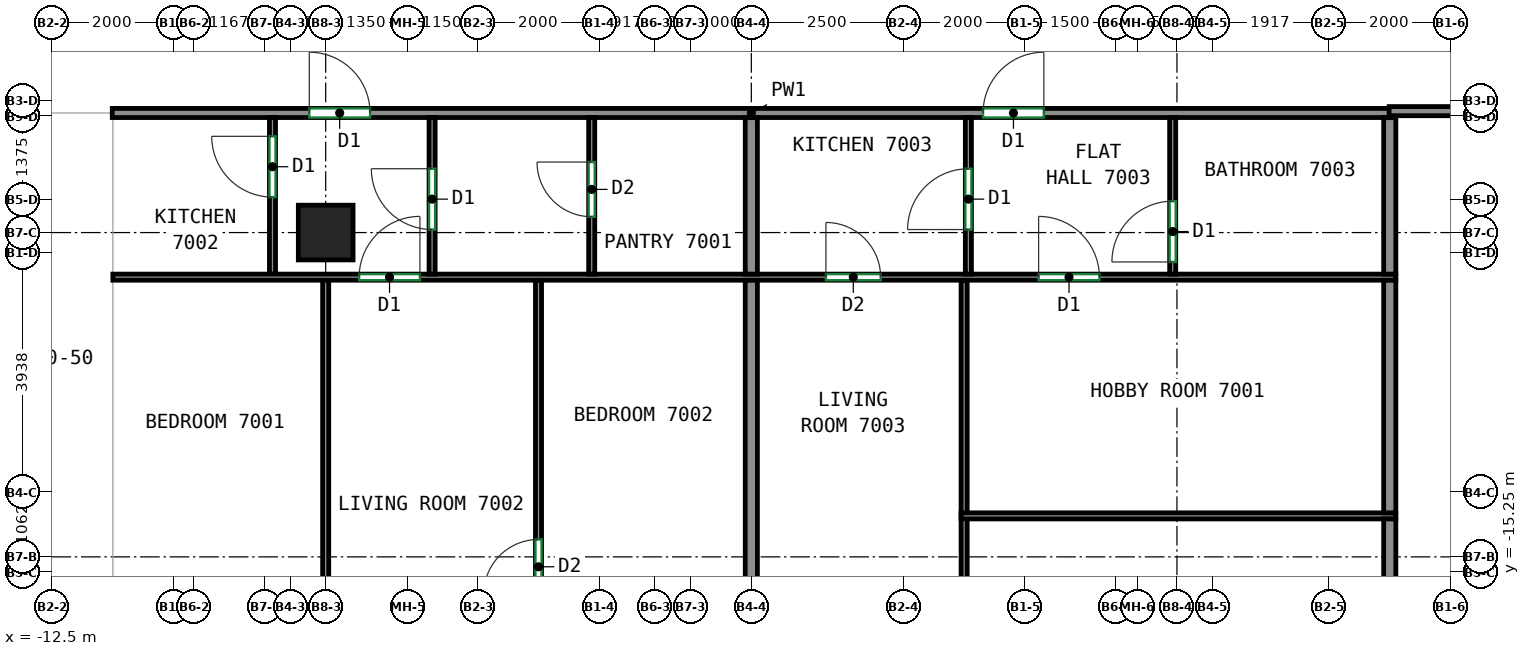
"""IFC4 building model, lengths in metres.
Left out: names, types, materials, properties, quantities, classifications, styles, units other than length and angle.
Written with IfcOpenShell. Run it as: python <this file> out.ifc"""

import sys

from ifc_helpers import new_model, si_unit, direction, frame, frame_2d, origin, origin_2d, place, context, subcontext, project, spatial, rectangle, extrude, source, transform, mapped, element, fill, save


model = new_model("IFC4")
c1 = context("Model", 3, precision=1e-05, world=origin(), true_north=direction((0.0, 1.0)))
c2 = subcontext(c1, "Body", "Model", "MODEL_VIEW")
j1 = project(units=[si_unit("LENGTHUNIT", "METRE"), si_unit("PLANEANGLEUNIT", "RADIAN")], contexts=[c1])
p1 = place(None, origin())
s1 = spatial("IfcSite", under=j1, at=p1, CompositionType="ELEMENT")
p2 = place(p1, origin())
s2 = spatial("IfcBuilding", under=s1, at=p2, CompositionType="ELEMENT")
p3 = place(p2, frame((0.0, 0.0, 284.0)))
s3 = spatial("IfcBuildingStorey", under=s2, at=p3, CompositionType="ELEMENT", Elevation=284.0)
m1 = source(origin(), c2, "Body", "SweptSolid", [
    extrude(rectangle(XDim=0.9, YDim=0.9, at=origin_2d()), origin(), (0.0, 0.0, 1.0), 3.12),
])
p4 = place(p3, frame((-8.0, -9.667, 0.0), z_axis=(0.0, 0.0, 1.0), x_axis=(1.0, 0.0, 0.0)))
e1 = element("IfcColumn", 1, at=p4, inside=s3, PredefinedType="COLUMN", context=c2, shape_type="MappedRepresentation", body=[
    mapped(m1, transform((0.0, 0.0, 0.0))),
])
p5 = place(p3, frame((-11.51, -7.7, 0.0), z_axis=(0.0, 0.0, 1.0), x_axis=(1.0, 0.0, 0.0)))
e2 = element("IfcWall", 2, at=p5, inside=s3, PredefinedType="PARTITIONING", context=c2, shape_type="SweptSolid", body=[
    extrude(rectangle(XDim=21.02, YDim=0.15, at=frame_2d((10.51, 0.0))), origin(), (0.0, 0.0, 1.0), 3.12),
])
p6 = place(p5, frame((3.24, 0.0, 0.0)))
e3 = element("IfcOpeningElement", 3, at=p6, cuts=e2, PredefinedType="OPENING", context=c2, shape_type="SweptSolid", body=[
    extrude(rectangle(XDim=1.0, YDim=2.1, at=frame_2d((0.5, 1.05))), frame((0.0, 0.085, 0.0), z_axis=(0.0, -1.0, 0.0), x_axis=(1.0, 0.0, 0.0)), (0.0, 0.0, 1.0), 0.17),
])
p7 = place(p5, frame((14.321, 0.0, 0.0)))
e4 = element("IfcOpeningElement", 4, at=p7, cuts=e2, PredefinedType="OPENING", context=c2, shape_type="SweptSolid", body=[
    extrude(rectangle(XDim=1.0, YDim=2.1, at=frame_2d((0.5, 1.05))), frame((0.0, 0.085, 0.0), z_axis=(0.0, -1.0, 0.0), x_axis=(1.0, 0.0, 0.0)), (0.0, 0.0, 1.0), 0.17),
])
p8 = place(p3, frame((9.49, -7.67, 0.0), z_axis=(0.0, 0.0, 1.0), x_axis=(1.0, 0.0, 0.0)))
e5 = element("IfcWall", 5, at=p8, inside=s3, PredefinedType="PARTITIONING", context=c2, shape_type="SweptSolid", body=[
    extrude(rectangle(XDim=9.61, YDim=0.15, at=frame_2d((4.805, 0.0))), origin(), (0.0, 0.0, 1.0), 3.12),
])
p9 = place(p8, frame((3.304, 0.0, 0.0)))
e6 = element("IfcOpeningElement", 6, at=p9, cuts=e5, PredefinedType="OPENING", context=c2, shape_type="SweptSolid", body=[
    extrude(rectangle(XDim=0.9, YDim=2.1, at=frame_2d((0.45, 1.05))), frame((0.0, 0.085, 0.0), z_axis=(0.0, -1.0, 0.0), x_axis=(1.0, 0.0, 0.0)), (0.0, 0.0, 1.0), 0.17),
])
p10 = place(p3, frame((-8.875, -10.35, 0.0), z_axis=(0.0, 0.0, 1.0), x_axis=(0.0, 1.0, 0.0)))
e7 = element("IfcWall", 7, at=p10, inside=s3, PredefinedType="PARTITIONING", context=c2, shape_type="SweptSolid", body=[
    extrude(rectangle(XDim=2.573, YDim=0.1, at=frame_2d((1.287, 0.0))), origin(), (0.0, 0.0, 1.0), 3.12),
])
p11 = place(p10, frame((1.266, 0.0, 0.0)))
e8 = element("IfcOpeningElement", 8, at=p11, cuts=e7, PredefinedType="OPENING", context=c2, shape_type="SweptSolid", body=[
    extrude(rectangle(XDim=1.0, YDim=2.1, at=frame_2d((0.5, 1.05))), frame((0.0, 0.06, 0.0), z_axis=(0.0, -1.0, 0.0), x_axis=(1.0, 0.0, 0.0)), (0.0, 0.0, 1.0), 0.12),
])
p12 = place(p3, frame((-11.5, -10.4, 0.0), z_axis=(0.0, 0.0, 1.0), x_axis=(1.0, 0.0, 0.0)))
e9 = element("IfcWall", 9, at=p12, inside=s3, PredefinedType="PARTITIONING", context=c2, shape_type="SweptSolid", body=[
    extrude(rectangle(XDim=21.1, YDim=0.1, at=frame_2d((10.55, 0.0))), origin(), (0.0, 0.0, 1.0), 3.12),
])
p13 = place(p12, frame((4.05, 0.0, 0.0)))
e10 = element("IfcOpeningElement", 10, at=p13, cuts=e9, PredefinedType="OPENING", context=c2, shape_type="SweptSolid", body=[
    extrude(rectangle(XDim=1.0, YDim=2.1, at=frame_2d((0.5, 1.05))), frame((0.0, 0.06, 0.0), z_axis=(0.0, -1.0, 0.0), x_axis=(1.0, 0.0, 0.0)), (0.0, 0.0, 1.0), 0.12),
])
p14 = place(p12, frame((11.727, 0.0, 0.0)))
e11 = element("IfcOpeningElement", 11, at=p14, cuts=e9, PredefinedType="OPENING", context=c2, shape_type="SweptSolid", body=[
    extrude(rectangle(XDim=0.9, YDim=2.1, at=frame_2d((0.45, 1.05))), frame((0.0, 0.06, 0.0), z_axis=(0.0, -1.0, 0.0), x_axis=(1.0, 0.0, 0.0)), (0.0, 0.0, 1.0), 0.12),
])
p15 = place(p12, frame((15.225, 0.0, 0.0)))
e12 = element("IfcOpeningElement", 12, at=p15, cuts=e9, PredefinedType="OPENING", context=c2, shape_type="SweptSolid", body=[
    extrude(rectangle(XDim=1.0, YDim=2.1, at=frame_2d((0.5, 1.05))), frame((0.0, 0.06, 0.0), z_axis=(0.0, -1.0, 0.0), x_axis=(1.0, 0.0, 0.0)), (0.0, 0.0, 1.0), 0.12),
])
p16 = place(p3, frame((-6.25, -10.35, 0.0), z_axis=(0.0, 0.0, 1.0), x_axis=(0.0, 1.0, 0.0)))
e13 = element("IfcWall", 13, at=p16, inside=s3, PredefinedType="PARTITIONING", context=c2, shape_type="SweptSolid", body=[
    extrude(rectangle(XDim=2.573, YDim=0.1, at=frame_2d((1.287, 0.0))), origin(), (0.0, 0.0, 1.0), 3.12),
])
p17 = place(p16, frame((0.733, 0.0, 0.0)))
e14 = element("IfcOpeningElement", 14, at=p17, cuts=e13, PredefinedType="OPENING", context=c2, shape_type="SweptSolid", body=[
    extrude(rectangle(XDim=1.0, YDim=2.1, at=frame_2d((0.5, 1.05))), frame((0.0, 0.06, 0.0), z_axis=(0.0, -1.0, 0.0), x_axis=(1.0, 0.0, 0.0)), (0.0, 0.0, 1.0), 0.12),
])
p18 = place(p3, frame((-3.625, -10.35, 0.0), z_axis=(0.0, 0.0, 1.0), x_axis=(0.0, 1.0, 0.0)))
e15 = element("IfcWall", 15, at=p18, inside=s3, PredefinedType="PARTITIONING", context=c2, shape_type="SweptSolid", body=[
    extrude(rectangle(XDim=2.573, YDim=0.1, at=frame_2d((1.287, 0.0))), origin(), (0.0, 0.0, 1.0), 3.12),
])
p19 = place(p18, frame((0.943, 0.0, 0.0)))
e16 = element("IfcOpeningElement", 16, at=p19, cuts=e15, PredefinedType="OPENING", context=c2, shape_type="SweptSolid", body=[
    extrude(rectangle(XDim=0.9, YDim=2.1, at=frame_2d((0.45, 1.05))), frame((0.0, 0.06, 0.0), z_axis=(0.0, -1.0, 0.0), x_axis=(1.0, 0.0, 0.0)), (0.0, 0.0, 1.0), 0.12),
])
p20 = place(p3, frame((-1.0, -10.35, 0.0), z_axis=(0.0, 0.0, 1.0), x_axis=(0.0, 1.0, 0.0)))
e17 = element("IfcWall", 17, at=p20, inside=s3, PredefinedType="PARTITIONING", context=c2, shape_type="SweptSolid", body=[
    extrude(rectangle(XDim=2.573, YDim=0.2, at=frame_2d((1.287, 0.0))), origin(), (0.0, 0.0, 1.0), 3.12),
])
p21 = place(p3, frame((-8.0, -17.725, 0.0), z_axis=(0.0, 0.0, 1.0), x_axis=(0.0, 1.0, 0.0)))
e18 = element("IfcWall", 18, at=p21, inside=s3, PredefinedType="PARTITIONING", context=c2, shape_type="SweptSolid", body=[
    extrude(rectangle(XDim=7.273, YDim=0.1, at=frame_2d((3.637, 0.0))), origin(), (0.0, 0.0, 1.0), 3.12),
])
p22 = place(p21, frame((1.111, 0.0, 0.0)))
e19 = element("IfcOpeningElement", 19, at=p22, cuts=e18, PredefinedType="OPENING", context=c2, shape_type="SweptSolid", body=[
    extrude(rectangle(XDim=0.9, YDim=2.1, at=frame_2d((0.45, 1.05))), frame((0.0, 0.06, 0.0), z_axis=(0.0, -1.0, 0.0), x_axis=(1.0, 0.0, 0.0)), (0.0, 0.0, 1.0), 0.12),
])
p23 = place(p3, frame((-4.5, -18.25, 0.0), z_axis=(0.0, 0.0, 1.0), x_axis=(0.0, 1.0, 0.0)))
e20 = element("IfcWall", 20, at=p23, inside=s3, PredefinedType="PARTITIONING", context=c2, shape_type="SweptSolid", body=[
    extrude(rectangle(XDim=7.798, YDim=0.1, at=frame_2d((3.899, 0.0))), origin(), (0.0, 0.0, 1.0), 3.12),
])
p24 = place(p23, frame((2.637, 0.0, 0.0)))
e21 = element("IfcOpeningElement", 21, at=p24, cuts=e20, PredefinedType="OPENING", context=c2, shape_type="SweptSolid", body=[
    extrude(rectangle(XDim=0.9, YDim=2.1, at=frame_2d((0.45, 1.05))), frame((0.0, 0.06, 0.0), z_axis=(0.0, -1.0, 0.0), x_axis=(1.0, 0.0, 0.0)), (0.0, 0.0, 1.0), 0.12),
])
p25 = place(p3, frame((-1.0, -17.725, 0.0), z_axis=(0.0, 0.0, 1.0), x_axis=(0.0, 1.0, 0.0)))
e22 = element("IfcWall", 22, at=p25, inside=s3, PredefinedType="PARTITIONING", context=c2, shape_type="SweptSolid", body=[
    extrude(rectangle(XDim=7.273, YDim=0.2, at=frame_2d((3.637, 0.0))), origin(), (0.0, 0.0, 1.0), 3.12),
])
p26 = place(p3, frame((2.57, -10.35, 0.0), z_axis=(0.0, 0.0, 1.0), x_axis=(0.0, 1.0, 0.0)))
e23 = element("IfcWall", 23, at=p26, inside=s3, PredefinedType="PARTITIONING", context=c2, shape_type="SweptSolid", body=[
    extrude(rectangle(XDim=2.573, YDim=0.1, at=frame_2d((1.287, 0.0))), origin(), (0.0, 0.0, 1.0), 3.12),
])
p27 = place(p26, frame((0.733, 0.0, 0.0)))
e24 = element("IfcOpeningElement", 24, at=p27, cuts=e23, PredefinedType="OPENING", context=c2, shape_type="SweptSolid", body=[
    extrude(rectangle(XDim=1.0, YDim=2.1, at=frame_2d((0.5, 1.05))), frame((0.0, 0.06, 0.0), z_axis=(0.0, -1.0, 0.0), x_axis=(1.0, 0.0, 0.0)), (0.0, 0.0, 1.0), 0.12),
])
p28 = place(p3, frame((5.93, -10.35, 0.0), z_axis=(0.0, 0.0, 1.0), x_axis=(0.0, 1.0, 0.0)))
e25 = element("IfcWall", 25, at=p28, inside=s3, PredefinedType="PARTITIONING", context=c2, shape_type="SweptSolid", body=[
    extrude(rectangle(XDim=2.573, YDim=0.1, at=frame_2d((1.287, 0.0))), origin(), (0.0, 0.0, 1.0), 3.12),
])
p29 = place(p28, frame((0.2, 0.0, 0.0)))
e26 = element("IfcOpeningElement", 26, at=p29, cuts=e25, PredefinedType="OPENING", context=c2, shape_type="SweptSolid", body=[
    extrude(rectangle(XDim=1.0, YDim=2.1, at=frame_2d((0.5, 1.05))), frame((0.0, 0.06, 0.0), z_axis=(0.0, -1.0, 0.0), x_axis=(1.0, 0.0, 0.0)), (0.0, 0.0, 1.0), 0.12),
])
p30 = place(p3, frame((9.5, -10.35, 0.0), z_axis=(0.0, 0.0, 1.0), x_axis=(0.0, 1.0, 0.0)))
e27 = element("IfcWall", 27, at=p30, inside=s3, PredefinedType="PARTITIONING", context=c2, shape_type="SweptSolid", body=[
    extrude(rectangle(XDim=2.573, YDim=0.2, at=frame_2d((1.287, 0.0))), origin(), (0.0, 0.0, 1.0), 3.12),
])
p31 = place(p3, frame((2.5, -18.25, 0.0), z_axis=(0.0, 0.0, 1.0), x_axis=(0.0, 1.0, 0.0)))
e28 = element("IfcWall", 28, at=p31, inside=s3, PredefinedType="PARTITIONING", context=c2, shape_type="SweptSolid", body=[
    extrude(rectangle(XDim=3.884, YDim=0.1, at=frame_2d((1.942, 0.0))), origin(), (0.0, 0.0, 1.0), 3.12),
])
p32 = place(p31, frame((1.337, 0.0, 0.0)))
e29 = element("IfcOpeningElement", 29, at=p32, cuts=e28, PredefinedType="OPENING", context=c2, shape_type="SweptSolid", body=[
    extrude(rectangle(XDim=0.9, YDim=2.1, at=frame_2d((0.45, 1.05))), frame((0.0, 0.06, 0.0), z_axis=(0.0, -1.0, 0.0), x_axis=(1.0, 0.0, 0.0)), (0.0, 0.0, 1.0), 0.12),
])
p33 = place(p3, frame((2.5, -14.286, 0.0), z_axis=(0.0, 0.0, 1.0), x_axis=(0.0, 1.0, 0.0)))
e30 = element("IfcWall", 30, at=p33, inside=s3, PredefinedType="PARTITIONING", context=c2, shape_type="SweptSolid", body=[
    extrude(rectangle(XDim=3.834, YDim=0.1, at=frame_2d((1.917, 0.0))), origin(), (0.0, 0.0, 1.0), 3.12),
])
p34 = place(p3, frame((9.6, -14.326, 0.0), z_axis=(0.0, 0.0, 1.0), x_axis=(-1.0, 0.0, 0.0)))
e31 = element("IfcWall", 31, at=p34, inside=s3, PredefinedType="PARTITIONING", context=c2, shape_type="SweptSolid", body=[
    extrude(rectangle(XDim=7.15, YDim=0.1, at=frame_2d((3.575, 0.0))), origin(), (0.0, 0.0, 1.0), 3.12),
])
p35 = place(p3, frame((9.5, -18.25, 0.0), z_axis=(0.0, 0.0, 1.0), x_axis=(0.0, 1.0, 0.0)))
e32 = element("IfcWall", 32, at=p35, inside=s3, PredefinedType="PARTITIONING", context=c2, shape_type="SweptSolid", body=[
    extrude(rectangle(XDim=3.874, YDim=0.2, at=frame_2d((1.937, 0.0))), origin(), (0.0, 0.0, 1.0), 3.12),
])
p36 = place(p3, frame((9.5, -14.276, 0.0), z_axis=(0.0, 0.0, 1.0), x_axis=(0.0, 1.0, 0.0)))
e33 = element("IfcWall", 33, at=p36, inside=s3, PredefinedType="PARTITIONING", context=c2, shape_type="SweptSolid", body=[
    extrude(rectangle(XDim=3.824, YDim=0.2, at=frame_2d((1.912, 0.0))), origin(), (0.0, 0.0, 1.0), 3.12),
])
p37 = place(p24, origin())
e34 = element("IfcDoor", 34, at=p37, inside=s3, OperationType="SINGLE_SWING_LEFT", PredefinedType="DOOR", context=c2, shape_type="SweptSolid", body=[
    extrude(rectangle(XDim=0.9, YDim=2.1, at=frame_2d((0.45, 1.05))), frame((0.0, 0.025, 0.0), z_axis=(0.0, -1.0, 0.0), x_axis=(1.0, 0.0, 0.0)), (0.0, 0.0, 1.0), 0.05),
])
fill(e21, e34)
p38 = place(p13, origin())
e35 = element("IfcDoor", 35, at=p38, inside=s3, OperationType="SINGLE_SWING_RIGHT", PredefinedType="DOOR", context=c2, shape_type="SweptSolid", body=[
    extrude(rectangle(XDim=1.0, YDim=2.1, at=frame_2d((0.5, 1.05))), frame((0.0, 0.025, 0.0), z_axis=(0.0, -1.0, 0.0), x_axis=(1.0, 0.0, 0.0)), (0.0, 0.0, 1.0), 0.05),
])
fill(e10, e35)
p39 = place(p14, origin())
e36 = element("IfcDoor", 36, at=p39, inside=s3, OperationType="SINGLE_SWING_LEFT", PredefinedType="DOOR", context=c2, shape_type="SweptSolid", body=[
    extrude(rectangle(XDim=0.9, YDim=2.1, at=frame_2d((0.45, 1.05))), frame((0.0, 0.025, 0.0), z_axis=(0.0, -1.0, 0.0), x_axis=(1.0, 0.0, 0.0)), (0.0, 0.0, 1.0), 0.05),
])
fill(e11, e36)
p40 = place(p15, origin())
e37 = element("IfcDoor", 37, at=p40, inside=s3, OperationType="SINGLE_SWING_LEFT", PredefinedType="DOOR", context=c2, shape_type="SweptSolid", body=[
    extrude(rectangle(XDim=1.0, YDim=2.1, at=frame_2d((0.5, 1.05))), frame((0.0, 0.025, 0.0), z_axis=(0.0, -1.0, 0.0), x_axis=(1.0, 0.0, 0.0)), (0.0, 0.0, 1.0), 0.05),
])
fill(e12, e37)
p41 = place(p29, origin())
e38 = element("IfcDoor", 38, at=p41, inside=s3, OperationType="SINGLE_SWING_LEFT", PredefinedType="DOOR", context=c2, shape_type="SweptSolid", body=[
    extrude(rectangle(XDim=1.0, YDim=2.1, at=frame_2d((0.5, 1.05))), frame((0.0, 0.025, 0.0), z_axis=(0.0, -1.0, 0.0), x_axis=(1.0, 0.0, 0.0)), (0.0, 0.0, 1.0), 0.05),
])
fill(e26, e38)
p42 = place(p17, origin())
e39 = element("IfcDoor", 39, at=p42, inside=s3, OperationType="SINGLE_SWING_RIGHT", PredefinedType="DOOR", context=c2, shape_type="SweptSolid", body=[
    extrude(rectangle(XDim=1.0, YDim=2.1, at=frame_2d((0.5, 1.05))), frame((0.0, 0.025, 0.0), z_axis=(0.0, -1.0, 0.0), x_axis=(1.0, 0.0, 0.0)), (0.0, 0.0, 1.0), 0.05),
])
fill(e14, e39)
p43 = place(p27, origin())
e40 = element("IfcDoor", 40, at=p43, inside=s3, OperationType="SINGLE_SWING_LEFT", PredefinedType="DOOR", context=c2, shape_type="SweptSolid", body=[
    extrude(rectangle(XDim=1.0, YDim=2.1, at=frame_2d((0.5, 1.05))), frame((0.0, 0.025, 0.0), z_axis=(0.0, -1.0, 0.0), x_axis=(1.0, 0.0, 0.0)), (0.0, 0.0, 1.0), 0.05),
])
fill(e24, e40)
p44 = place(p19, origin())
e41 = element("IfcDoor", 41, at=p44, inside=s3, OperationType="SINGLE_SWING_RIGHT", PredefinedType="DOOR", context=c2, shape_type="SweptSolid", body=[
    extrude(rectangle(XDim=0.9, YDim=2.1, at=frame_2d((0.45, 1.05))), frame((0.0, 0.025, 0.0), z_axis=(0.0, -1.0, 0.0), x_axis=(1.0, 0.0, 0.0)), (0.0, 0.0, 1.0), 0.05),
])
fill(e16, e41)
p45 = place(p11, origin())
e42 = element("IfcDoor", 42, at=p45, inside=s3, OperationType="SINGLE_SWING_RIGHT", PredefinedType="DOOR", context=c2, shape_type="SweptSolid", body=[
    extrude(rectangle(XDim=1.0, YDim=2.1, at=frame_2d((0.5, 1.05))), frame((0.0, 0.025, 0.0), z_axis=(0.0, -1.0, 0.0), x_axis=(1.0, 0.0, 0.0)), (0.0, 0.0, 1.0), 0.05),
])
fill(e8, e42)
p46 = place(p6, origin())
e43 = element("IfcDoor", 43, at=p46, inside=s3, OperationType="SINGLE_SWING_LEFT", PredefinedType="DOOR", context=c2, shape_type="SweptSolid", body=[
    extrude(rectangle(XDim=1.0, YDim=2.1, at=frame_2d((0.5, 1.05))), frame((0.0, 0.025, 0.0), z_axis=(0.0, -1.0, 0.0), x_axis=(1.0, 0.0, 0.0)), (0.0, 0.0, 1.0), 0.05),
])
fill(e3, e43)
p47 = place(p7, origin())
e44 = element("IfcDoor", 44, at=p47, inside=s3, OperationType="SINGLE_SWING_RIGHT", PredefinedType="DOOR", context=c2, shape_type="SweptSolid", body=[
    extrude(rectangle(XDim=1.0, YDim=2.1, at=frame_2d((0.5, 1.05))), frame((0.0, 0.025, 0.0), z_axis=(0.0, -1.0, 0.0), x_axis=(1.0, 0.0, 0.0)), (0.0, 0.0, 1.0), 0.05),
])
fill(e4, e44)
save(model, sys.argv[1])
